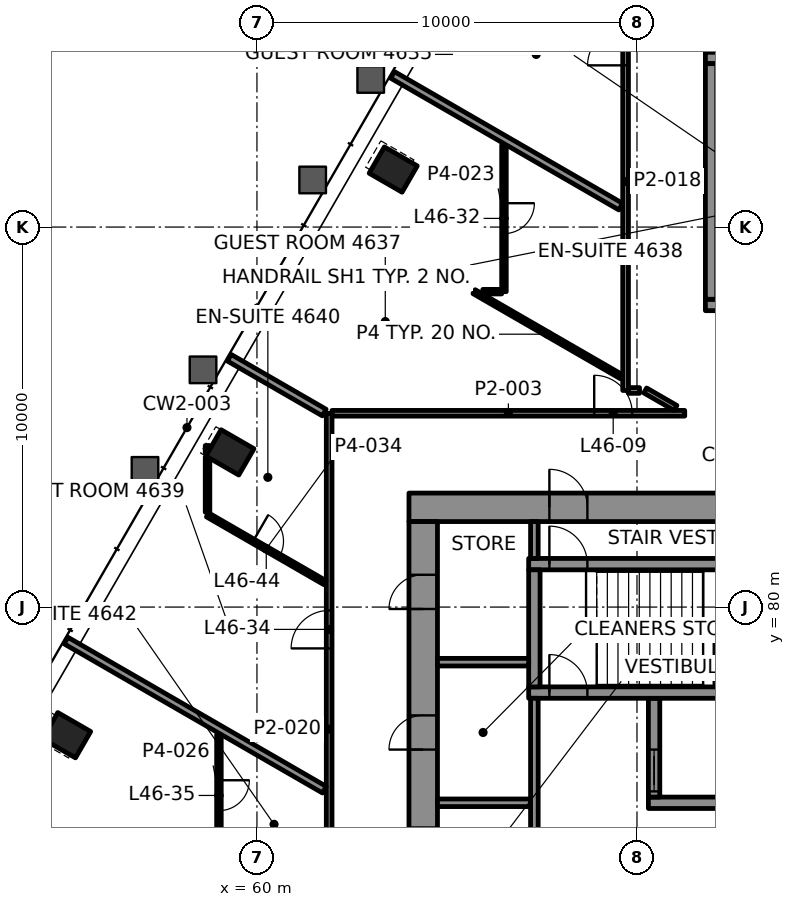
"""IFC4 building model, lengths in metres.
Left out: names, types, materials, properties, quantities, classifications, styles, units other than length and angle.
Written with IfcOpenShell. Run it as: python <this file> out.ifc"""

import sys

from ifc_helpers import new_model, si_unit, direction, frame, frame_2d, origin, origin_2d, place, context, subcontext, project, spatial, rectangle, hollow_rectangle, extrude, element, fill, save


model = new_model("IFC4")
c1 = context("Model", 3, precision=1e-05, world=origin(), true_north=direction((0.0, 1.0)))
c2 = subcontext(c1, "Body", "Model", "MODEL_VIEW")
j1 = project(units=[si_unit("LENGTHUNIT", "METRE"), si_unit("PLANEANGLEUNIT", "RADIAN")], contexts=[c1])
p1 = place(None, origin())
s1 = spatial("IfcSite", under=j1, at=p1, CompositionType="ELEMENT")
p2 = place(p1, origin())
s2 = spatial("IfcBuilding", under=s1, at=p2, CompositionType="ELEMENT")
p3 = place(p2, frame((0.0, 0.0, 198.7)))
s3 = spatial("IfcBuildingStorey", under=s2, at=p3, CompositionType="ELEMENT", Elevation=198.7)
for number, where, z_axis, x_axis in (
    (1, (63.586, 91.513, -0.0), (0.0, 0.0, 1.0), (-0.5, -0.866, 0.0)),
    (2, (59.289, 84.071, -0.0), (0.0, 0.0, 1.0), (-0.5, -0.866, 0.0)),
    (3, (54.992, 76.628, -0.0), (0.0, 0.0, 1.0), (-0.5, -0.866, 0.0)),
):
    element("IfcColumn", number, at=place(p3, frame(where, z_axis=z_axis, x_axis=x_axis)), inside=s3, PredefinedType="COLUMN", context=c2, shape_type="SweptSolid", body=[
        extrude(hollow_rectangle(XDim=0.8, YDim=1.0, WallThickness=0.05, at=origin_2d()), origin(), (0.0, 0.0, 1.0), 3.9),
    ])
p4 = place(p3, frame((64.0, 82.625, 0.0), z_axis=(0.0, 0.0, 1.0), x_axis=(1.0, 0.0, 0.0)))
e4 = element("IfcWall", 4, at=p4, inside=s3, PredefinedType="SHEAR", context=c2, shape_type="SweptSolid", body=[
    extrude(rectangle(XDim=22.0, YDim=0.75, at=frame_2d((11.0, 0.0))), origin(), (0.0, 0.0, 1.0), 3.7),
])
p5 = place(p4, frame((3.695, 0.0, 0.0)))
e5 = element("IfcOpeningElement", 5, at=p5, cuts=e4, PredefinedType="OPENING", context=c2, shape_type="SweptSolid", body=[
    extrude(rectangle(XDim=1.0, YDim=2.1, at=frame_2d((0.5, 1.05))), frame((0.0, 0.385, 0.0), z_axis=(0.0, -1.0, 0.0), x_axis=(1.0, 0.0, 0.0)), (0.0, 0.0, 1.0), 0.77),
])
p6 = place(p4, frame((17.505, 0.0, 0.0)))
e6 = element("IfcOpeningElement", 6, at=p6, cuts=e4, PredefinedType="OPENING", context=c2, shape_type="SweptSolid", body=[
    extrude(rectangle(XDim=1.0, YDim=2.1, at=frame_2d((0.5, 1.05))), frame((0.0, 0.385, 0.0), z_axis=(0.0, -1.0, 0.0), x_axis=(1.0, 0.0, 0.0)), (0.0, 0.0, 1.0), 0.77),
])
p7 = place(p4, frame((10.65, 0.0, 0.0)))
e7 = element("IfcOpeningElement", 7, at=p7, cuts=e4, PredefinedType="OPENING", context=c2, shape_type="SweptSolid", body=[
    extrude(rectangle(XDim=0.9, YDim=2.1, at=frame_2d((0.45, 1.05))), frame((0.0, 0.385, 0.0), z_axis=(0.0, -1.0, 0.0), x_axis=(1.0, 0.0, 0.0)), (0.0, 0.0, 1.0), 0.77),
])
p8 = place(p3, frame((64.375, 67.75, 0.0), z_axis=(0.0, 0.0, 1.0), x_axis=(0.0, 1.0, 0.0)))
e8 = element("IfcWall", 8, at=p8, inside=s3, PredefinedType="SHEAR", context=c2, shape_type="SweptSolid", body=[
    extrude(rectangle(XDim=14.5, YDim=0.75, at=frame_2d((7.25, 0.0))), origin(), (0.0, 0.0, 1.0), 3.7),
])
p9 = place(p8, frame((4.65, 0.0, 0.0)))
e9 = element("IfcOpeningElement", 9, at=p9, cuts=e8, PredefinedType="OPENING", context=c2, shape_type="SweptSolid", body=[
    extrude(rectangle(XDim=1.8, YDim=2.1, at=frame_2d((0.9, 1.05))), frame((0.0, 0.385, 0.0), z_axis=(0.0, -1.0, 0.0), x_axis=(1.0, 0.0, 0.0)), (0.0, 0.0, 1.0), 0.77),
])
p10 = place(p8, frame((8.5, 0.0, 0.0)))
e10 = element("IfcOpeningElement", 10, at=p10, cuts=e8, PredefinedType="OPENING", context=c2, shape_type="SweptSolid", body=[
    extrude(rectangle(XDim=0.9, YDim=2.1, at=frame_2d((0.45, 1.05))), frame((0.0, 0.385, 0.0), z_axis=(0.0, -1.0, 0.0), x_axis=(1.0, 0.0, 0.0)), (0.0, 0.0, 1.0), 0.77),
])
p11 = place(p8, frame((12.2, 0.0, 0.0)))
e11 = element("IfcOpeningElement", 11, at=p11, cuts=e8, PredefinedType="OPENING", context=c2, shape_type="SweptSolid", body=[
    extrude(rectangle(XDim=0.9, YDim=2.1, at=frame_2d((0.45, 1.05))), frame((0.0, 0.385, 0.0), z_axis=(0.0, -1.0, 0.0), x_axis=(1.0, 0.0, 0.0)), (0.0, 0.0, 1.0), 0.77),
])
p12 = place(p3, frame((70.3, 74.85, 0.0), z_axis=(0.0, 0.0, 1.0), x_axis=(1.0, 0.0, 0.0)))
e12 = element("IfcWall", 12, at=p12, inside=s3, PredefinedType="SHEAR", context=c2, shape_type="SweptSolid", body=[
    extrude(rectangle(XDim=14.3, YDim=0.3, at=frame_2d((7.15, 0.0))), origin(), (0.0, 0.0, 1.0), 3.7),
])
p13 = place(p12, frame((3.8, 0.0, 0.0)))
e13 = element("IfcOpeningElement", 13, at=p13, cuts=e12, PredefinedType="OPENING", context=c2, shape_type="SweptSolid", body=[
    extrude(rectangle(XDim=1.1, YDim=2.1, at=frame_2d((0.55, 1.05))), frame((0.0, 0.16, 0.0), z_axis=(0.0, -1.0, 0.0), x_axis=(1.0, 0.0, 0.0)), (0.0, 0.0, 1.0), 0.32),
])
p14 = place(p12, frame((12.2, 0.0, 0.0)))
e14 = element("IfcOpeningElement", 14, at=p14, cuts=e12, PredefinedType="OPENING", context=c2, shape_type="SweptSolid", body=[
    extrude(rectangle(XDim=1.1, YDim=2.1, at=frame_2d((0.55, 1.05))), frame((0.0, 0.16, 0.0), z_axis=(0.0, -1.0, 0.0), x_axis=(1.0, 0.0, 0.0)), (0.0, 0.0, 1.0), 0.32),
])
p15 = place(p3, frame((70.45, 75.0, 0.0), z_axis=(0.0, 0.0, 1.0), x_axis=(0.0, 1.0, 0.0)))
e15 = element("IfcWall", 15, at=p15, inside=s3, PredefinedType="SHEAR", context=c2, shape_type="SweptSolid", body=[
    extrude(rectangle(XDim=2.6, YDim=0.3, at=frame_2d((1.3, 0.0))), origin(), (0.0, 0.0, 1.0), 3.7),
])
p16 = place(p15, frame((0.15, 0.0, 0.0)))
e16 = element("IfcOpeningElement", 16, at=p16, cuts=e15, PredefinedType="OPENING", context=c2, shape_type="SweptSolid", body=[
    extrude(rectangle(XDim=1.1, YDim=2.1, at=frame_2d((0.55, 1.05))), frame((0.0, 0.16, 0.0), z_axis=(0.0, -1.0, 0.0), x_axis=(1.0, 0.0, 0.0)), (0.0, 0.0, 1.0), 0.32),
])
p17 = place(p3, frame((67.15, 77.75, 0.0), z_axis=(0.0, 0.0, 1.0), x_axis=(1.0, 0.0, 0.0)))
e17 = element("IfcWall", 17, at=p17, inside=s3, PredefinedType="SHEAR", context=c2, shape_type="SweptSolid", body=[
    extrude(rectangle(XDim=17.45, YDim=0.3, at=frame_2d((8.725, 0.0))), origin(), (0.0, 0.0, 1.0), 3.7),
])
p18 = place(p17, frame((0.545, 0.0, 0.0)))
e18 = element("IfcOpeningElement", 18, at=p18, cuts=e17, PredefinedType="OPENING", context=c2, shape_type="SweptSolid", body=[
    extrude(rectangle(XDim=1.0, YDim=2.1, at=frame_2d((0.5, 1.05))), frame((0.0, 0.16, 0.0), z_axis=(0.0, -1.0, 0.0), x_axis=(1.0, 0.0, 0.0)), (0.0, 0.0, 1.0), 0.32),
])
p19 = place(p3, frame((67.15, 81.13, 0.0), z_axis=(0.0, 0.0, 1.0), x_axis=(1.0, 0.0, 0.0)))
e19 = element("IfcWall", 19, at=p19, inside=s3, PredefinedType="SHEAR", context=c2, shape_type="SweptSolid", body=[
    extrude(rectangle(XDim=6.91, YDim=0.3, at=frame_2d((3.455, 0.0))), origin(), (0.0, 0.0, 1.0), 3.7),
])
p20 = place(p19, frame((0.545, 0.0, 0.0)))
e20 = element("IfcOpeningElement", 20, at=p20, cuts=e19, PredefinedType="OPENING", context=c2, shape_type="SweptSolid", body=[
    extrude(rectangle(XDim=1.0, YDim=2.1, at=frame_2d((0.5, 1.05))), frame((0.0, 0.16, 0.0), z_axis=(0.0, -1.0, 0.0), x_axis=(1.0, 0.0, 0.0)), (0.0, 0.0, 1.0), 0.32),
])
p21 = place(p3, frame((67.3, 77.9, 0.0), z_axis=(0.0, 0.0, 1.0), x_axis=(0.0, 1.0, 0.0)))
e21 = element("IfcWall", 21, at=p21, inside=s3, PredefinedType="SHEAR", context=c2, shape_type="SweptSolid", body=[
    extrude(rectangle(XDim=3.08, YDim=0.3, at=frame_2d((1.54, 0.0))), origin(), (0.0, 0.0, 1.0), 3.7),
])
p22 = place(p3, frame((71.8, 87.95, 0.0), z_axis=(0.0, 0.0, 1.0), x_axis=(1.0, 0.0, 0.0)))
e22 = element("IfcWall", 22, at=p22, inside=s3, PredefinedType="SHEAR", context=c2, shape_type="SweptSolid", body=[
    extrude(rectangle(XDim=6.4, YDim=0.3, at=frame_2d((3.2, 0.0))), origin(), (0.0, 0.0, 1.0), 3.7),
])
p23 = place(p22, frame((1.325, 0.0, 0.0)))
e23 = element("IfcOpeningElement", 23, at=p23, cuts=e22, PredefinedType="OPENING", context=c2, shape_type="SweptSolid", body=[
    extrude(rectangle(XDim=1.0, YDim=2.1, at=frame_2d((0.5, 1.05))), frame((0.0, 0.16, 0.0), z_axis=(0.0, -1.0, 0.0), x_axis=(1.0, 0.0, 0.0)), (0.0, 0.0, 1.0), 0.32),
])
p24 = place(p22, frame((4.125, 0.0, 0.0)))
e24 = element("IfcOpeningElement", 24, at=p24, cuts=e22, PredefinedType="OPENING", context=c2, shape_type="SweptSolid", body=[
    extrude(rectangle(XDim=1.2, YDim=2.1, at=frame_2d((0.6, 1.05))), frame((0.0, 0.16, 0.0), z_axis=(0.0, -1.0, 0.0), x_axis=(1.0, 0.0, 0.0)), (0.0, 0.0, 1.0), 0.32),
])
p25 = place(p3, frame((71.8, 94.45, 0.0), z_axis=(0.0, 0.0, 1.0), x_axis=(1.0, 0.0, 0.0)))
e25 = element("IfcWall", 25, at=p25, inside=s3, PredefinedType="SHEAR", context=c2, shape_type="SweptSolid", body=[
    extrude(rectangle(XDim=6.4, YDim=0.3, at=frame_2d((3.2, 0.0))), origin(), (0.0, 0.0, 1.0), 3.7),
])
p26 = place(p3, frame((71.95, 88.1, 0.0), z_axis=(0.0, 0.0, 1.0), x_axis=(0.0, 1.0, 0.0)))
e26 = element("IfcWall", 26, at=p26, inside=s3, PredefinedType="SHEAR", context=c2, shape_type="SweptSolid", body=[
    extrude(rectangle(XDim=6.2, YDim=0.3, at=frame_2d((3.1, 0.0))), origin(), (0.0, 0.0, 1.0), 3.7),
])
p27 = place(p3, frame((61.976, 85.1, 0.0), z_axis=(0.0, 0.0, 1.0), x_axis=(1.0, 0.0, 0.0)))
e27 = element("IfcWall", 27, at=p27, inside=s3, PredefinedType="PARTITIONING", context=c2, shape_type="SweptSolid", body=[
    extrude(rectangle(XDim=9.281, YDim=0.15, at=frame_2d((4.64, 0.0))), origin(), (0.0, 0.0, 1.0), 3.097),
])
p28 = place(p27, frame((6.899, 0.0, 0.0)))
e28 = element("IfcOpeningElement", 28, at=p28, cuts=e27, PredefinedType="OPENING", context=c2, shape_type="SweptSolid", body=[
    extrude(rectangle(XDim=1.0, YDim=2.1, at=frame_2d((0.5, 1.05))), frame((0.0, 0.085, 0.0), z_axis=(0.0, -1.0, 0.0), x_axis=(1.0, 0.0, 0.0)), (0.0, 0.0, 1.0), 0.17),
])
p29 = place(p3, frame((69.775, 85.7, 0.0), z_axis=(0.0, 0.0, 1.0), x_axis=(1.0, 0.0, 0.0)))
e29 = element("IfcWall", 29, at=p29, inside=s3, PredefinedType="PARTITIONING", context=c2, shape_type="SweptSolid", body=[
    extrude(rectangle(XDim=0.292, YDim=0.15, at=frame_2d((0.146, 0.0))), origin(), (0.0, 0.0, 1.0), 3.097),
])
p30 = place(p3, frame((65.944, 88.3, 0.0), z_axis=(0.0, 0.0, 1.0), x_axis=(1.0, 0.0, 0.0)))
e30 = element("IfcWall", 30, at=p30, inside=s3, PredefinedType="PARTITIONING", context=c2, shape_type="SweptSolid", body=[
    extrude(rectangle(XDim=0.496, YDim=0.12, at=frame_2d((0.248, 0.0))), origin(), (0.0, 0.0, 1.0), 3.097),
])
p31 = place(p3, frame((69.7, 85.7, 0.0), z_axis=(0.0, 0.0, 1.0), x_axis=(0.0, 1.0, 0.0)))
e31 = element("IfcWall", 31, at=p31, inside=s3, PredefinedType="PARTITIONING", context=c2, shape_type="SweptSolid", body=[
    extrude(rectangle(XDim=10.999, YDim=0.15, at=frame_2d((5.5, 0.0))), origin(), (0.0, 0.0, 1.0), 3.097),
])
p32 = place(p31, frame((8.555, 0.0, 0.0)))
e32 = element("IfcOpeningElement", 32, at=p32, cuts=e31, PredefinedType="OPENING", context=c2, shape_type="SweptSolid", body=[
    extrude(rectangle(XDim=1.0, YDim=2.1, at=frame_2d((0.5, 1.05))), frame((0.0, 0.085, 0.0), z_axis=(0.0, -1.0, 0.0), x_axis=(1.0, 0.0, 0.0)), (0.0, 0.0, 1.0), 0.17),
])
p33 = place(p3, frame((66.5, 92.156, 0.0), z_axis=(0.0, 0.0, 1.0), x_axis=(0.0, -1.0, 0.0)))
e33 = element("IfcWall", 33, at=p33, inside=s3, PredefinedType="PARTITIONING", context=c2, shape_type="SweptSolid", body=[
    extrude(rectangle(XDim=3.856, YDim=0.12, at=frame_2d((1.928, 0.0))), origin(), (0.0, 0.0, 1.0), 3.1),
])
p34 = place(p33, frame((1.528, 0.0, 0.0)))
e34 = element("IfcOpeningElement", 34, at=p34, cuts=e33, PredefinedType="OPENING", context=c2, shape_type="SweptSolid", body=[
    extrude(rectangle(XDim=0.8, YDim=2.1, at=frame_2d((0.4, 1.05))), frame((0.0, 0.07, 0.0), z_axis=(0.0, -1.0, 0.0), x_axis=(1.0, 0.0, 0.0)), (0.0, 0.0, 1.0), 0.14),
])
p35 = place(p3, frame((61.9, 68.476, 0.0), z_axis=(0.0, 0.0, 1.0), x_axis=(0.0, 1.0, 0.0)))
e35 = element("IfcWall", 35, at=p35, inside=s3, PredefinedType="PARTITIONING", context=c2, shape_type="SweptSolid", body=[
    extrude(rectangle(XDim=16.624, YDim=0.15, at=frame_2d((8.312, 0.0))), origin(), (0.0, 0.0, 1.0), 3.1),
])
p36 = place(p35, frame((1.984, 0.0, 0.0)))
e36 = element("IfcOpeningElement", 36, at=p36, cuts=e35, PredefinedType="OPENING", context=c2, shape_type="SweptSolid", body=[
    extrude(rectangle(XDim=1.0, YDim=2.1, at=frame_2d((0.5, 1.05))), frame((0.0, 0.085, 0.0), z_axis=(0.0, -1.0, 0.0), x_axis=(1.0, 0.0, 0.0)), (0.0, 0.0, 1.0), 0.17),
])
p37 = place(p35, frame((10.437, 0.0, 0.0)))
e37 = element("IfcOpeningElement", 37, at=p37, cuts=e35, PredefinedType="OPENING", context=c2, shape_type="SweptSolid", body=[
    extrude(rectangle(XDim=1.0, YDim=2.1, at=frame_2d((0.5, 1.05))), frame((0.0, 0.085, 0.0), z_axis=(0.0, -1.0, 0.0), x_axis=(1.0, 0.0, 0.0)), (0.0, 0.0, 1.0), 0.17),
])
p38 = place(p3, frame((59.0, 76.64, 0.0), z_axis=(0.0, 0.0, 1.0), x_axis=(0.0, -1.0, 0.0)))
e38 = element("IfcWall", 38, at=p38, inside=s3, PredefinedType="PARTITIONING", context=c2, shape_type="SweptSolid", body=[
    extrude(rectangle(XDim=3.194, YDim=0.12, at=frame_2d((1.597, 0.0))), origin(), (0.0, 0.0, 1.0), 3.1),
])
p39 = place(p38, frame((1.197, 0.0, 0.0)))
e39 = element("IfcOpeningElement", 39, at=p39, cuts=e38, PredefinedType="OPENING", context=c2, shape_type="SweptSolid", body=[
    extrude(rectangle(XDim=0.8, YDim=2.1, at=frame_2d((0.4, 1.05))), frame((0.0, 0.07, 0.0), z_axis=(0.0, -1.0, 0.0), x_axis=(1.0, 0.0, 0.0)), (0.0, 0.0, 1.0), 0.14),
])
p40 = place(p3, frame((58.7, 82.495, 0.0), z_axis=(0.0, 0.0, 1.0), x_axis=(0.0, 1.0, 0.0)))
e40 = element("IfcWall", 40, at=p40, inside=s3, PredefinedType="PARTITIONING", context=c2, shape_type="SweptSolid", body=[
    extrude(rectangle(XDim=1.453, YDim=0.12, at=frame_2d((0.727, 0.0))), origin(), (0.0, 0.0, 1.0), 3.022),
])
p41 = place(p3, frame((58.7, 84.051, 0.0), z_axis=(0.0, 0.0, 1.0), x_axis=(0.0, 1.0, 0.0)))
e41 = element("IfcWall", 41, at=p41, inside=s3, PredefinedType="PARTITIONING", context=c2, shape_type="SweptSolid", body=[
    extrude(rectangle(XDim=0.2, YDim=0.12, at=frame_2d((0.1, 0.0))), origin(), (0.0, 0.0, 1.0), 3.1),
])
p42 = place(p3, frame((69.573, 90.537, 0.0), z_axis=(0.0, 0.0, 1.0), x_axis=(-0.866030778866, 0.49999068997, 0.0)))
e42 = element("IfcWall", 42, at=p42, inside=s3, PredefinedType="PARTITIONING", context=c2, shape_type="SweptSolid", body=[
    extrude(rectangle(XDim=6.933, YDim=0.2, at=frame_2d((3.467, 0.0))), origin(), (0.0, 0.0, 1.0), 3.022),
])
p43 = place(p3, frame((71.014, 85.24, 0.0), z_axis=(0.0, 0.0, 1.0), x_axis=(-0.865964657013, 0.500105201737, 0.0)))
e43 = element("IfcWall", 43, at=p43, inside=s3, PredefinedType="PARTITIONING", context=c2, shape_type="SweptSolid", body=[
    extrude(rectangle(XDim=0.92, YDim=0.15, at=frame_2d((0.46, 0.0))), origin(), (0.0, 0.0, 1.0), 3.097),
])
p44 = place(p3, frame((69.59, 86.062, 0.0), z_axis=(0.0, 0.0, 1.0), x_axis=(-0.866029361473, 0.49999314502, 0.0)))
e44 = element("IfcWall", 44, at=p44, inside=s3, PredefinedType="PARTITIONING", context=c2, shape_type="SweptSolid", body=[
    extrude(rectangle(XDim=4.476, YDim=0.12, at=frame_2d((2.238, 0.0))), origin(), (0.0, 0.0, 1.0), 3.097),
])
p45 = place(p3, frame((61.77, 85.119, 0.0), z_axis=(0.0, 0.0, 1.0), x_axis=(-0.866026331101, 0.499998393838, 0.0)))
e45 = element("IfcWall", 45, at=p45, inside=s3, PredefinedType="PARTITIONING", context=c2, shape_type="SweptSolid", body=[
    extrude(rectangle(XDim=2.885, YDim=0.2, at=frame_2d((1.442, 0.0))), origin(), (0.0, 0.0, 1.0), 3.022),
])
p46 = place(p3, frame((58.7, 82.426, 0.0), z_axis=(0.0, 0.0, 1.0), x_axis=(0.866028357664, -0.499994883695, 0.0)))
e46 = element("IfcWall", 46, at=p46, inside=s3, PredefinedType="PARTITIONING", context=c2, shape_type="SweptSolid", body=[
    extrude(rectangle(XDim=3.568, YDim=0.12, at=frame_2d((1.784, 0.0))), origin(), (0.0, 0.0, 1.0), 3.1),
])
p47 = place(p46, frame((1.384, 0.0, 0.0)))
e47 = element("IfcOpeningElement", 47, at=p47, cuts=e46, PredefinedType="OPENING", context=c2, shape_type="SweptSolid", body=[
    extrude(rectangle(XDim=0.8, YDim=2.1, at=frame_2d((0.4, 1.05))), frame((0.0, 0.07, 0.0), z_axis=(0.0, -1.0, 0.0), x_axis=(1.0, 0.0, 0.0)), (0.0, 0.0, 1.0), 0.14),
])
p48 = place(p3, frame((61.773, 75.195, 0.0), z_axis=(0.0, 0.0, 1.0), x_axis=(-0.866029689717, 0.499992576473, 0.0)))
e48 = element("IfcWall", 48, at=p48, inside=s3, PredefinedType="PARTITIONING", context=c2, shape_type="SweptSolid", body=[
    extrude(rectangle(XDim=7.85, YDim=0.2, at=frame_2d((3.925, 0.0))), origin(), (0.0, 0.0, 1.0), 3.022),
])
p49 = place(p3, frame((64.75, 74.85, 0.0), z_axis=(0.0, 0.0, 1.0), x_axis=(1.0, 0.0, 0.0)))
e49 = element("IfcWall", 49, at=p49, inside=s3, PredefinedType="PARTITIONING", context=c2, shape_type="SweptSolid", body=[
    extrude(rectangle(XDim=2.45, YDim=0.2, at=frame_2d((1.225, 0.0))), origin(), (0.0, 0.0, 1.0), 3.7),
])
p50 = place(p3, frame((64.75, 78.55, 0.0), z_axis=(0.0, 0.0, 1.0), x_axis=(1.0, 0.0, 0.0)))
e50 = element("IfcWall", 50, at=p50, inside=s3, PredefinedType="PARTITIONING", context=c2, shape_type="SweptSolid", body=[
    extrude(rectangle(XDim=2.4, YDim=0.2, at=frame_2d((1.2, 0.0))), origin(), (0.0, 0.0, 1.0), 3.7),
])
p51 = place(p3, frame((67.3, 71.85, 0.0), z_axis=(0.0, 0.0, 1.0), x_axis=(0.0, 1.0, 0.0)))
e51 = element("IfcWall", 51, at=p51, inside=s3, PredefinedType="PARTITIONING", context=c2, shape_type="SweptSolid", body=[
    extrude(rectangle(XDim=5.75, YDim=0.2, at=frame_2d((2.875, 0.0))), origin(), (0.0, 0.0, 1.0), 3.7),
])
p52 = place(p51, frame((0.85, 0.0, 0.0)))
e52 = element("IfcOpeningElement", 52, at=p52, cuts=e51, PredefinedType="OPENING", context=c2, shape_type="SweptSolid", body=[
    extrude(rectangle(XDim=1.2, YDim=2.1, at=frame_2d((0.6, 1.05))), frame((0.0, 0.11, 0.0), z_axis=(0.0, -1.0, 0.0), x_axis=(1.0, 0.0, 0.0)), (0.0, 0.0, 1.0), 0.22),
])
p53 = place(p3, frame((67.3, 81.28, 0.0), z_axis=(0.0, 0.0, 1.0), x_axis=(0.0, 1.0, 0.0)))
e53 = element("IfcWall", 53, at=p53, inside=s3, PredefinedType="PARTITIONING", context=c2, shape_type="SweptSolid", body=[
    extrude(rectangle(XDim=0.97, YDim=0.2, at=frame_2d((0.485, 0.0))), origin(), (0.0, 0.0, 1.0), 3.7),
])
p54 = place(p28, origin())
e54 = element("IfcDoor", 54, at=p54, inside=s3, OperationType="SINGLE_SWING_RIGHT", PredefinedType="DOOR", context=c2, shape_type="SweptSolid", body=[
    extrude(rectangle(XDim=1.0, YDim=2.1, at=frame_2d((0.5, 1.05))), frame((0.0, 0.025, 0.0), z_axis=(0.0, -1.0, 0.0), x_axis=(1.0, 0.0, 0.0)), (0.0, 0.0, 1.0), 0.05),
])
fill(e28, e54)
p55 = place(p32, origin())
e55 = element("IfcDoor", 55, at=p55, inside=s3, OperationType="SINGLE_SWING_RIGHT", PredefinedType="DOOR", context=c2, shape_type="SweptSolid", body=[
    extrude(rectangle(XDim=1.0, YDim=2.1, at=frame_2d((0.5, 1.05))), frame((0.0, 0.025, 0.0), z_axis=(0.0, -1.0, 0.0), x_axis=(1.0, 0.0, 0.0)), (0.0, 0.0, 1.0), 0.05),
])
fill(e32, e55)
p56 = place(p34, origin())
e56 = element("IfcDoor", 56, at=p56, inside=s3, OperationType="SINGLE_SWING_RIGHT", PredefinedType="DOOR", context=c2, shape_type="SweptSolid", body=[
    extrude(rectangle(XDim=0.8, YDim=2.1, at=frame_2d((0.4, 1.05))), frame((0.0, 0.025, 0.0), z_axis=(0.0, -1.0, 0.0), x_axis=(1.0, 0.0, 0.0)), (0.0, 0.0, 1.0), 0.05),
])
fill(e34, e56)
p57 = place(p37, origin())
e57 = element("IfcDoor", 57, at=p57, inside=s3, OperationType="SINGLE_SWING_RIGHT", PredefinedType="DOOR", context=c2, shape_type="SweptSolid", body=[
    extrude(rectangle(XDim=1.0, YDim=2.1, at=frame_2d((0.5, 1.05))), frame((0.0, 0.025, 0.0), z_axis=(0.0, -1.0, 0.0), x_axis=(1.0, 0.0, 0.0)), (0.0, 0.0, 1.0), 0.05),
])
fill(e37, e57)
p58 = place(p39, origin())
e58 = element("IfcDoor", 58, at=p58, inside=s3, OperationType="SINGLE_SWING_RIGHT", PredefinedType="DOOR", context=c2, shape_type="SweptSolid", body=[
    extrude(rectangle(XDim=0.8, YDim=2.1, at=frame_2d((0.4, 1.05))), frame((0.0, 0.025, 0.0), z_axis=(0.0, -1.0, 0.0), x_axis=(1.0, 0.0, 0.0)), (0.0, 0.0, 1.0), 0.05),
])
fill(e39, e58)
p59 = place(p47, origin())
e59 = element("IfcDoor", 59, at=p59, inside=s3, OperationType="SINGLE_SWING_RIGHT", PredefinedType="DOOR", context=c2, shape_type="SweptSolid", body=[
    extrude(rectangle(XDim=0.8, YDim=2.1, at=frame_2d((0.4, 1.05))), frame((0.0, 0.025, 0.0), z_axis=(0.0, -1.0, 0.0), x_axis=(1.0, 0.0, 0.0)), (0.0, 0.0, 1.0), 0.05),
])
fill(e47, e59)
p60 = place(p16, origin())
e60 = element("IfcDoor", 60, at=p60, inside=s3, OperationType="DOUBLE_DOOR_SLIDING", PredefinedType="DOOR", context=c2, shape_type="SweptSolid", body=[
    extrude(rectangle(XDim=1.1, YDim=2.1, at=frame_2d((0.55, 1.05))), frame((0.0, 0.025, 0.0), z_axis=(0.0, -1.0, 0.0), x_axis=(1.0, 0.0, 0.0)), (0.0, 0.0, 1.0), 0.05),
])
fill(e16, e60)
p61 = place(p18, origin())
e61 = element("IfcDoor", 61, at=p61, inside=s3, OperationType="SINGLE_SWING_LEFT", PredefinedType="DOOR", context=c2, shape_type="SweptSolid", body=[
    extrude(rectangle(XDim=1.0, YDim=2.1, at=frame_2d((0.5, 1.05))), frame((0.0, 0.025, 0.0), z_axis=(0.0, -1.0, 0.0), x_axis=(1.0, 0.0, 0.0)), (0.0, 0.0, 1.0), 0.05),
])
fill(e18, e61)
p62 = place(p20, origin())
e62 = element("IfcDoor", 62, at=p62, inside=s3, OperationType="SINGLE_SWING_RIGHT", PredefinedType="DOOR", context=c2, shape_type="SweptSolid", body=[
    extrude(rectangle(XDim=1.0, YDim=2.1, at=frame_2d((0.5, 1.05))), frame((0.0, 0.025, 0.0), z_axis=(0.0, -1.0, 0.0), x_axis=(1.0, 0.0, 0.0)), (0.0, 0.0, 1.0), 0.05),
])
fill(e20, e62)
p63 = place(p5, origin())
e63 = element("IfcDoor", 63, at=p63, inside=s3, OperationType="SINGLE_SWING_LEFT", PredefinedType="DOOR", context=c2, shape_type="SweptSolid", body=[
    extrude(rectangle(XDim=1.0, YDim=2.1, at=frame_2d((0.5, 1.05))), frame((0.0, 0.095, 0.0), z_axis=(0.0, -1.0, 0.0), x_axis=(1.0, 0.0, 0.0)), (0.0, 0.0, 1.0), 0.19),
])
fill(e5, e63)
p64 = place(p10, origin())
e64 = element("IfcDoor", 64, at=p64, inside=s3, OperationType="SINGLE_SWING_RIGHT", PredefinedType="DOOR", context=c2, shape_type="SweptSolid", body=[
    extrude(rectangle(XDim=0.9, YDim=2.1, at=frame_2d((0.45, 1.05))), frame((0.0, 0.095, 0.0), z_axis=(0.0, -1.0, 0.0), x_axis=(1.0, 0.0, 0.0)), (0.0, 0.0, 1.0), 0.19),
])
fill(e10, e64)
p65 = place(p11, origin())
e65 = element("IfcDoor", 65, at=p65, inside=s3, OperationType="SINGLE_SWING_LEFT", PredefinedType="DOOR", context=c2, shape_type="SweptSolid", body=[
    extrude(rectangle(XDim=0.9, YDim=2.1, at=frame_2d((0.45, 1.05))), frame((0.0, 0.095, 0.0), z_axis=(0.0, -1.0, 0.0), x_axis=(1.0, 0.0, 0.0)), (0.0, 0.0, 1.0), 0.19),
])
fill(e11, e65)
save(model, sys.argv[1])
